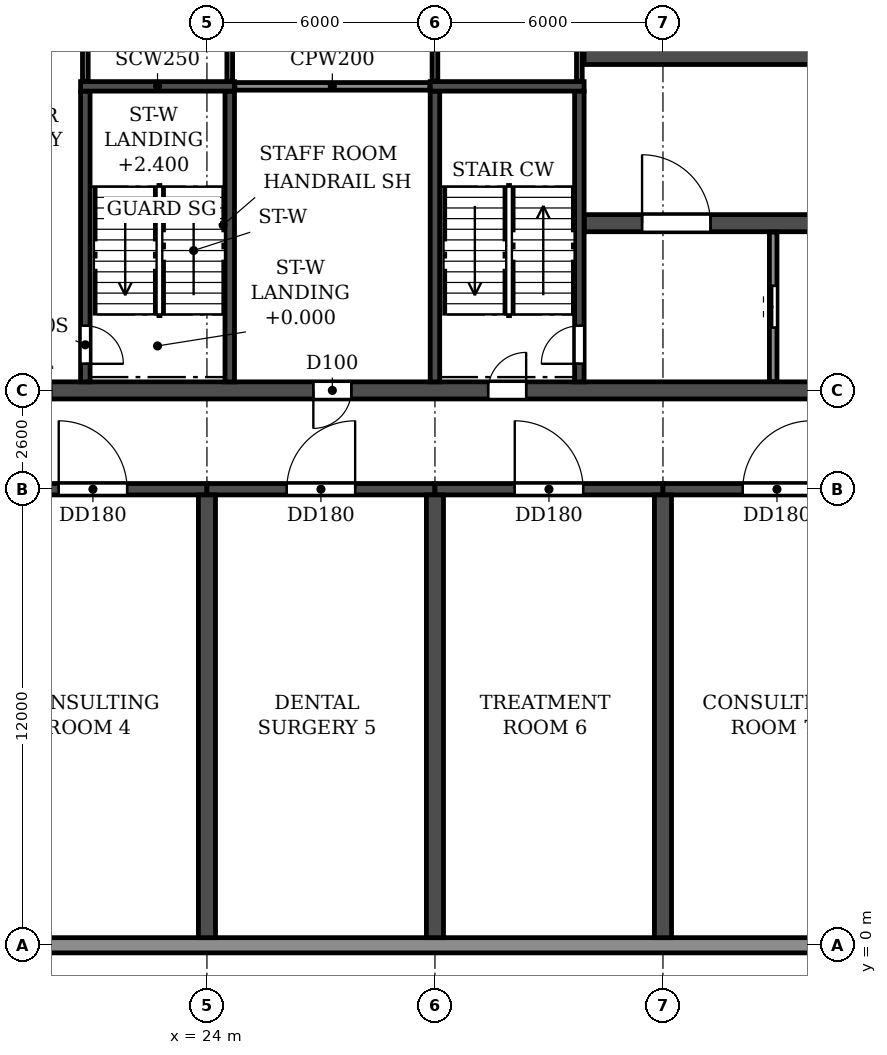
"""IFC4 building model, lengths in metres.
Left out: names, types, materials, properties, quantities, classifications, styles, units other than length and angle.
Written with IfcOpenShell. Run it as: python <this file> out.ifc"""

import sys

from ifc_helpers import new_model, si_unit, direction, frame, frame_2d, origin, place, context, subcontext, project, spatial, rectangle, extrude, element, fill, save


model = new_model("IFC4")
c1 = context("Model", 3, precision=1e-05, world=origin(), true_north=direction((0.0, 1.0)))
c2 = subcontext(c1, "Body", "Model", "MODEL_VIEW")
j1 = project(units=[si_unit("LENGTHUNIT", "METRE"), si_unit("PLANEANGLEUNIT", "RADIAN")], contexts=[c1])
p1 = place(None, origin())
s1 = spatial("IfcSite", under=j1, at=p1, CompositionType="ELEMENT")
p2 = place(p1, origin())
s2 = spatial("IfcBuilding", under=s1, at=p2, CompositionType="ELEMENT")
p3 = place(p2, frame((0.0, 0.0, 6.0)))
s3 = spatial("IfcBuildingStorey", under=s2, at=p3, CompositionType="ELEMENT", Elevation=6.0)
for number, where, z_axis, x_axis in (
    (1, (24.0, 0.2, 0.0), (0.0, 0.0, 1.0), (0.0, 1.0, 0.0)),
    (2, (30.0, 0.2, 0.0), (0.0, 0.0, 1.0), (0.0, 1.0, 0.0)),
    (3, (36.0, 0.2, 0.0), (0.0, 0.0, 1.0), (0.0, 1.0, 0.0)),
):
    element("IfcWall", number, at=place(p3, frame(where, z_axis=z_axis, x_axis=x_axis)), inside=s3, PredefinedType="SHEAR", context=c2, shape_type="SweptSolid", body=[
        extrude(rectangle(XDim=11.65, YDim=0.45, at=frame_2d((5.825, 0.0))), origin(), (0.0, 0.0, 1.0), 4.52),
    ])
p4 = place(p3, frame((18.0, 12.0, 0.0), z_axis=(0.0, 0.0, 1.0), x_axis=(1.0, 0.0, 0.0)))
e4 = element("IfcWall", 4, at=p4, inside=s3, PredefinedType="SHEAR", context=c2, shape_type="SweptSolid", body=[
    extrude(rectangle(XDim=6.0, YDim=0.3, at=frame_2d((3.0, 0.0))), origin(), (0.0, 0.0, 1.0), 3.92),
])
p5 = place(p4, frame((2.1, 0.0, 0.0)))
e5 = element("IfcOpeningElement", 5, at=p5, cuts=e4, PredefinedType="OPENING", context=c2, shape_type="SweptSolid", body=[
    extrude(rectangle(XDim=1.8, YDim=2.1, at=frame_2d((0.9, 1.05))), frame((0.0, 0.16, 0.0), z_axis=(0.0, -1.0, 0.0), x_axis=(1.0, 0.0, 0.0)), (0.0, 0.0, 1.0), 0.32),
])
p6 = place(p3, frame((24.0, 12.0, 0.0), z_axis=(0.0, 0.0, 1.0), x_axis=(1.0, 0.0, 0.0)))
e6 = element("IfcWall", 6, at=p6, inside=s3, PredefinedType="SHEAR", context=c2, shape_type="SweptSolid", body=[
    extrude(rectangle(XDim=6.0, YDim=0.3, at=frame_2d((3.0, 0.0))), origin(), (0.0, 0.0, 1.0), 3.92),
])
p7 = place(p6, frame((2.1, 0.0, 0.0)))
e7 = element("IfcOpeningElement", 7, at=p7, cuts=e6, PredefinedType="OPENING", context=c2, shape_type="SweptSolid", body=[
    extrude(rectangle(XDim=1.8, YDim=2.1, at=frame_2d((0.9, 1.05))), frame((0.0, 0.16, 0.0), z_axis=(0.0, -1.0, 0.0), x_axis=(1.0, 0.0, 0.0)), (0.0, 0.0, 1.0), 0.32),
])
p8 = place(p3, frame((30.0, 12.0, 0.0), z_axis=(0.0, 0.0, 1.0), x_axis=(1.0, 0.0, 0.0)))
e8 = element("IfcWall", 8, at=p8, inside=s3, PredefinedType="SHEAR", context=c2, shape_type="SweptSolid", body=[
    extrude(rectangle(XDim=6.0, YDim=0.3, at=frame_2d((3.0, 0.0))), origin(), (0.0, 0.0, 1.0), 3.92),
])
p9 = place(p8, frame((2.1, 0.0, 0.0)))
e9 = element("IfcOpeningElement", 9, at=p9, cuts=e8, PredefinedType="OPENING", context=c2, shape_type="SweptSolid", body=[
    extrude(rectangle(XDim=1.8, YDim=2.1, at=frame_2d((0.9, 1.05))), frame((0.0, 0.16, 0.0), z_axis=(0.0, -1.0, 0.0), x_axis=(1.0, 0.0, 0.0)), (0.0, 0.0, 1.0), 0.32),
])
p10 = place(p3, frame((36.0, 12.0, 0.0), z_axis=(0.0, 0.0, 1.0), x_axis=(1.0, 0.0, 0.0)))
e10 = element("IfcWall", 10, at=p10, inside=s3, PredefinedType="SHEAR", context=c2, shape_type="SweptSolid", body=[
    extrude(rectangle(XDim=6.0, YDim=0.3, at=frame_2d((3.0, 0.0))), origin(), (0.0, 0.0, 1.0), 3.92),
])
p11 = place(p10, frame((2.1, 0.0, 0.0)))
e11 = element("IfcOpeningElement", 11, at=p11, cuts=e10, PredefinedType="OPENING", context=c2, shape_type="SweptSolid", body=[
    extrude(rectangle(XDim=1.8, YDim=2.1, at=frame_2d((0.9, 1.05))), frame((0.0, 0.16, 0.0), z_axis=(0.0, -1.0, 0.0), x_axis=(1.0, 0.0, 0.0)), (0.0, 0.0, 1.0), 0.32),
])
p12 = place(p3, frame((18.0, 14.6, 0.0), z_axis=(0.0, 0.0, 1.0), x_axis=(1.0, 0.0, 0.0)))
e12 = element("IfcWall", 12, at=p12, inside=s3, PredefinedType="SOLIDWALL", context=c2, shape_type="SweptSolid", body=[
    extrude(rectangle(XDim=66.0, YDim=0.45, at=frame_2d((33.0, 0.0))), origin(), (0.0, 0.0, 1.0), 4.52),
])
p13 = place(p12, frame((0.9, 0.0, 0.0)))
e13 = element("IfcOpeningElement", 13, at=p13, cuts=e12, PredefinedType="OPENING", context=c2, shape_type="SweptSolid", body=[
    extrude(rectangle(XDim=1.0, YDim=2.1, at=frame_2d((0.5, 1.05))), frame((0.0, 0.235, 0.0), z_axis=(0.0, -1.0, 0.0), x_axis=(1.0, 0.0, 0.0)), (0.0, 0.0, 1.0), 0.47),
])
p14 = place(p12, frame((8.8, 0.0, 0.0)))
e14 = element("IfcOpeningElement", 14, at=p14, cuts=e12, PredefinedType="OPENING", context=c2, shape_type="SweptSolid", body=[
    extrude(rectangle(XDim=1.0, YDim=2.1, at=frame_2d((0.5, 1.05))), frame((0.0, 0.235, 0.0), z_axis=(0.0, -1.0, 0.0), x_axis=(1.0, 0.0, 0.0)), (0.0, 0.0, 1.0), 0.47),
])
p15 = place(p12, frame((13.4, 0.0, 0.0)))
e15 = element("IfcOpeningElement", 15, at=p15, cuts=e12, PredefinedType="OPENING", context=c2, shape_type="SweptSolid", body=[
    extrude(rectangle(XDim=1.0, YDim=2.1, at=frame_2d((0.5, 1.05))), frame((0.0, 0.235, 0.0), z_axis=(0.0, -1.0, 0.0), x_axis=(1.0, 0.0, 0.0)), (0.0, 0.0, 1.0), 0.47),
])
p16 = place(p12, frame((26.0, 0.0, 0.0)))
e16 = element("IfcOpeningElement", 16, at=p16, cuts=e12, PredefinedType="OPENING", context=c2, shape_type="SweptSolid", body=[
    extrude(rectangle(XDim=1.0, YDim=2.1, at=frame_2d((0.5, 1.05))), frame((0.0, 0.235, 0.0), z_axis=(0.0, -1.0, 0.0), x_axis=(1.0, 0.0, 0.0)), (0.0, 0.0, 1.0), 0.47),
])
p17 = place(p12, frame((29.9, 0.0, 0.0)))
e17 = element("IfcOpeningElement", 17, at=p17, cuts=e12, PredefinedType="OPENING", context=c2, shape_type="SweptSolid", body=[
    extrude(rectangle(XDim=1.0, YDim=2.1, at=frame_2d((0.5, 1.05))), frame((0.0, 0.235, 0.0), z_axis=(0.0, -1.0, 0.0), x_axis=(1.0, 0.0, 0.0)), (0.0, 0.0, 1.0), 0.47),
])
p18 = place(p12, frame((32.5, 0.0, 0.0)))
e18 = element("IfcOpeningElement", 18, at=p18, cuts=e12, PredefinedType="OPENING", context=c2, shape_type="SweptSolid", body=[
    extrude(rectangle(XDim=1.0, YDim=2.1, at=frame_2d((0.5, 1.05))), frame((0.0, 0.235, 0.0), z_axis=(0.0, -1.0, 0.0), x_axis=(1.0, 0.0, 0.0)), (0.0, 0.0, 1.0), 0.47),
])
p19 = place(p12, frame((37.7, 0.0, 0.0)))
e19 = element("IfcOpeningElement", 19, at=p19, cuts=e12, PredefinedType="OPENING", context=c2, shape_type="SweptSolid", body=[
    extrude(rectangle(XDim=1.0, YDim=2.1, at=frame_2d((0.5, 1.05))), frame((0.0, 0.235, 0.0), z_axis=(0.0, -1.0, 0.0), x_axis=(1.0, 0.0, 0.0)), (0.0, 0.0, 1.0), 0.47),
])
p20 = place(p12, frame((51.6, 0.0, 0.0)))
e20 = element("IfcOpeningElement", 20, at=p20, cuts=e12, PredefinedType="OPENING", context=c2, shape_type="SweptSolid", body=[
    extrude(rectangle(XDim=1.0, YDim=2.1, at=frame_2d((0.5, 1.05))), frame((0.0, 0.235, 0.0), z_axis=(0.0, -1.0, 0.0), x_axis=(1.0, 0.0, 0.0)), (0.0, 0.0, 1.0), 0.47),
])
p21 = place(p12, frame((56.2, 0.0, 0.0)))
e21 = element("IfcOpeningElement", 21, at=p21, cuts=e12, PredefinedType="OPENING", context=c2, shape_type="SweptSolid", body=[
    extrude(rectangle(XDim=1.0, YDim=2.1, at=frame_2d((0.5, 1.05))), frame((0.0, 0.235, 0.0), z_axis=(0.0, -1.0, 0.0), x_axis=(1.0, 0.0, 0.0)), (0.0, 0.0, 1.0), 0.47),
])
p22 = place(p12, frame((64.1, 0.0, 0.0)))
e22 = element("IfcOpeningElement", 22, at=p22, cuts=e12, PredefinedType="OPENING", context=c2, shape_type="SweptSolid", body=[
    extrude(rectangle(XDim=1.0, YDim=2.1, at=frame_2d((0.5, 1.05))), frame((0.0, 0.235, 0.0), z_axis=(0.0, -1.0, 0.0), x_axis=(1.0, 0.0, 0.0)), (0.0, 0.0, 1.0), 0.47),
])
p23 = place(p3, frame((33.925, 19.0, 0.0), z_axis=(0.0, 0.0, 1.0), x_axis=(1.0, 0.0, 0.0)))
e23 = element("IfcWall", 23, at=p23, inside=s3, PredefinedType="SOLIDWALL", context=c2, shape_type="SweptSolid", body=[
    extrude(rectangle(XDim=34.15, YDim=0.45, at=frame_2d((17.075, 0.0))), origin(), (0.0, 0.0, 1.0), 4.52),
])
p24 = place(p23, frame((16.175, 0.0, 0.0)))
e24 = element("IfcOpeningElement", 24, at=p24, cuts=e23, PredefinedType="OPENING", context=c2, shape_type="SweptSolid", body=[
    extrude(rectangle(XDim=1.8, YDim=2.1, at=frame_2d((0.9, 1.05))), frame((0.0, 0.235, 0.0), z_axis=(0.0, -1.0, 0.0), x_axis=(1.0, 0.0, 0.0)), (0.0, 0.0, 1.0), 0.47),
])
p25 = place(p23, frame((1.525, 0.0, 0.0)))
e25 = element("IfcOpeningElement", 25, at=p25, cuts=e23, PredefinedType="OPENING", context=c2, shape_type="SweptSolid", body=[
    extrude(rectangle(XDim=1.8, YDim=2.1, at=frame_2d((0.9, 1.05))), frame((0.0, 0.235, 0.0), z_axis=(0.0, -1.0, 0.0), x_axis=(1.0, 0.0, 0.0)), (0.0, 0.0, 1.0), 0.47),
])
p26 = place(p23, frame((8.725, 0.0, 0.0)))
e26 = element("IfcOpeningElement", 26, at=p26, cuts=e23, PredefinedType="OPENING", context=c2, shape_type="SweptSolid", body=[
    extrude(rectangle(XDim=1.1, YDim=2.1, at=frame_2d((0.55, 1.05))), frame((0.0, 0.235, 0.0), z_axis=(0.0, -1.0, 0.0), x_axis=(1.0, 0.0, 0.0)), (0.0, 0.0, 1.0), 0.47),
])
p27 = place(p23, frame((11.325, 0.0, 0.0)))
e27 = element("IfcOpeningElement", 27, at=p27, cuts=e23, PredefinedType="OPENING", context=c2, shape_type="SweptSolid", body=[
    extrude(rectangle(XDim=1.1, YDim=2.1, at=frame_2d((0.55, 1.05))), frame((0.0, 0.235, 0.0), z_axis=(0.0, -1.0, 0.0), x_axis=(1.0, 0.0, 0.0)), (0.0, 0.0, 1.0), 0.47),
])
p28 = place(p23, frame((13.925, 0.0, 0.0)))
e28 = element("IfcOpeningElement", 28, at=p28, cuts=e23, PredefinedType="OPENING", context=c2, shape_type="SweptSolid", body=[
    extrude(rectangle(XDim=1.1, YDim=2.1, at=frame_2d((0.55, 1.05))), frame((0.0, 0.235, 0.0), z_axis=(0.0, -1.0, 0.0), x_axis=(1.0, 0.0, 0.0)), (0.0, 0.0, 1.0), 0.47),
])
p29 = place(p23, frame((19.125, 0.0, 0.0)))
e29 = element("IfcOpeningElement", 29, at=p29, cuts=e23, PredefinedType="OPENING", context=c2, shape_type="SweptSolid", body=[
    extrude(rectangle(XDim=1.1, YDim=2.1, at=frame_2d((0.55, 1.05))), frame((0.0, 0.235, 0.0), z_axis=(0.0, -1.0, 0.0), x_axis=(1.0, 0.0, 0.0)), (0.0, 0.0, 1.0), 0.47),
])
p30 = place(p23, frame((21.725, 0.0, 0.0)))
e30 = element("IfcOpeningElement", 30, at=p30, cuts=e23, PredefinedType="OPENING", context=c2, shape_type="SweptSolid", body=[
    extrude(rectangle(XDim=1.1, YDim=2.1, at=frame_2d((0.55, 1.05))), frame((0.0, 0.235, 0.0), z_axis=(0.0, -1.0, 0.0), x_axis=(1.0, 0.0, 0.0)), (0.0, 0.0, 1.0), 0.47),
])
p31 = place(p23, frame((24.325, 0.0, 0.0)))
e31 = element("IfcOpeningElement", 31, at=p31, cuts=e23, PredefinedType="OPENING", context=c2, shape_type="SweptSolid", body=[
    extrude(rectangle(XDim=1.1, YDim=2.1, at=frame_2d((0.55, 1.05))), frame((0.0, 0.235, 0.0), z_axis=(0.0, -1.0, 0.0), x_axis=(1.0, 0.0, 0.0)), (0.0, 0.0, 1.0), 0.47),
])
p32 = place(p23, frame((30.825, 0.0, 0.0)))
e32 = element("IfcOpeningElement", 32, at=p32, cuts=e23, PredefinedType="OPENING", context=c2, shape_type="SweptSolid", body=[
    extrude(rectangle(XDim=1.8, YDim=2.1, at=frame_2d((0.9, 1.05))), frame((0.0, 0.235, 0.0), z_axis=(0.0, -1.0, 0.0), x_axis=(1.0, 0.0, 0.0)), (0.0, 0.0, 1.0), 0.47),
])
p33 = place(p3, frame((33.925, 23.4, 0.0), z_axis=(0.0, 0.0, 1.0), x_axis=(1.0, 0.0, 0.0)))
e33 = element("IfcWall", 33, at=p33, inside=s3, PredefinedType="SOLIDWALL", context=c2, shape_type="SweptSolid", body=[
    extrude(rectangle(XDim=34.15, YDim=0.45, at=frame_2d((17.075, 0.0))), origin(), (0.0, 0.0, 1.0), 4.52),
])
p34 = place(p33, frame((16.175, 0.0, 0.0)))
e34 = element("IfcOpeningElement", 34, at=p34, cuts=e33, PredefinedType="OPENING", context=c2, shape_type="SweptSolid", body=[
    extrude(rectangle(XDim=1.8, YDim=2.1, at=frame_2d((0.9, 1.05))), frame((0.0, 0.235, 0.0), z_axis=(0.0, -1.0, 0.0), x_axis=(1.0, 0.0, 0.0)), (0.0, 0.0, 1.0), 0.47),
])
p35 = place(p33, frame((11.025, 0.0, 0.0)))
e35 = element("IfcOpeningElement", 35, at=p35, cuts=e33, PredefinedType="OPENING", context=c2, shape_type="SweptSolid", body=[
    extrude(rectangle(XDim=1.1, YDim=2.1, at=frame_2d((0.55, 1.05))), frame((0.0, 0.235, 0.0), z_axis=(0.0, -1.0, 0.0), x_axis=(1.0, 0.0, 0.0)), (0.0, 0.0, 1.0), 0.47),
])
p36 = place(p33, frame((29.825, 0.0, 0.0)))
e36 = element("IfcOpeningElement", 36, at=p36, cuts=e33, PredefinedType="OPENING", context=c2, shape_type="SweptSolid", body=[
    extrude(rectangle(XDim=1.1, YDim=2.1, at=frame_2d((0.55, 1.05))), frame((0.0, 0.235, 0.0), z_axis=(0.0, -1.0, 0.0), x_axis=(1.0, 0.0, 0.0)), (0.0, 0.0, 1.0), 0.47),
])
p37 = place(p33, frame((32.425, 0.0, 0.0)))
e37 = element("IfcOpeningElement", 37, at=p37, cuts=e33, PredefinedType="OPENING", context=c2, shape_type="SweptSolid", body=[
    extrude(rectangle(XDim=1.1, YDim=2.1, at=frame_2d((0.55, 1.05))), frame((0.0, 0.235, 0.0), z_axis=(0.0, -1.0, 0.0), x_axis=(1.0, 0.0, 0.0)), (0.0, 0.0, 1.0), 0.47),
])
p38 = place(p3, frame((30.0, 14.825, 0.0), z_axis=(0.0, 0.0, 1.0), x_axis=(0.0, 1.0, 0.0)))
e38 = element("IfcWall", 38, at=p38, inside=s3, PredefinedType="SOLIDWALL", context=c2, shape_type="SweptSolid", body=[
    extrude(rectangle(XDim=7.65, YDim=0.25, at=frame_2d((3.825, 0.0))), origin(), (0.0, 0.0, 1.0), 4.52),
])
p39 = place(p3, frame((33.8, 14.825, 0.0), z_axis=(0.0, 0.0, 1.0), x_axis=(0.0, 1.0, 0.0)))
e39 = element("IfcWall", 39, at=p39, inside=s3, PredefinedType="SOLIDWALL", context=c2, shape_type="SweptSolid", body=[
    extrude(rectangle(XDim=7.65, YDim=0.25, at=frame_2d((3.825, 0.0))), origin(), (0.0, 0.0, 1.0), 4.52),
])
p40 = place(p39, frame((0.475, 0.0, 0.0)))
e40 = element("IfcOpeningElement", 40, at=p40, cuts=e39, PredefinedType="OPENING", context=c2, shape_type="SweptSolid", body=[
    extrude(rectangle(XDim=1.0, YDim=2.1, at=frame_2d((0.5, 1.05))), frame((0.0, 0.135, 0.0), z_axis=(0.0, -1.0, 0.0), x_axis=(1.0, 0.0, 0.0)), (0.0, 0.0, 1.0), 0.27),
])
p41 = place(p3, frame((29.875, 22.6, 0.0), z_axis=(0.0, 0.0, 1.0), x_axis=(1.0, 0.0, 0.0)))
e41 = element("IfcWall", 41, at=p41, inside=s3, PredefinedType="SOLIDWALL", context=c2, shape_type="SweptSolid", body=[
    extrude(rectangle(XDim=4.05, YDim=0.25, at=frame_2d((2.025, 0.0))), origin(), (0.0, 0.0, 1.0), 4.52),
])
p42 = place(p3, frame((20.8, 14.825, 0.0), z_axis=(0.0, 0.0, 1.0), x_axis=(0.0, 1.0, 0.0)))
e42 = element("IfcWall", 42, at=p42, inside=s3, PredefinedType="SOLIDWALL", context=c2, shape_type="SweptSolid", body=[
    extrude(rectangle(XDim=7.65, YDim=0.25, at=frame_2d((3.825, 0.0))), origin(), (0.0, 0.0, 1.0), 4.52),
])
p43 = place(p42, frame((0.475, 0.0, 0.0)))
e43 = element("IfcOpeningElement", 43, at=p43, cuts=e42, PredefinedType="OPENING", context=c2, shape_type="SweptSolid", body=[
    extrude(rectangle(XDim=1.0, YDim=2.1, at=frame_2d((0.5, 1.05))), frame((0.0, 0.135, 0.0), z_axis=(0.0, -1.0, 0.0), x_axis=(1.0, 0.0, 0.0)), (0.0, 0.0, 1.0), 0.27),
])
p44 = place(p3, frame((24.6, 14.825, 0.0), z_axis=(0.0, 0.0, 1.0), x_axis=(0.0, 1.0, 0.0)))
e44 = element("IfcWall", 44, at=p44, inside=s3, PredefinedType="SOLIDWALL", context=c2, shape_type="SweptSolid", body=[
    extrude(rectangle(XDim=7.65, YDim=0.25, at=frame_2d((3.825, 0.0))), origin(), (0.0, 0.0, 1.0), 4.52),
])
p45 = place(p3, frame((20.675, 22.6, 0.0), z_axis=(0.0, 0.0, 1.0), x_axis=(1.0, 0.0, 0.0)))
e45 = element("IfcWall", 45, at=p45, inside=s3, PredefinedType="SOLIDWALL", context=c2, shape_type="SweptSolid", body=[
    extrude(rectangle(XDim=4.05, YDim=0.25, at=frame_2d((2.025, 0.0))), origin(), (0.0, 0.0, 1.0), 4.52),
])
p46 = place(p3, frame((-3.0, 0.0, 0.0), z_axis=(0.0, 0.0, 1.0), x_axis=(1.0, 0.0, 0.0)))
e46 = element("IfcWall", 46, at=p46, inside=s3, PredefinedType="STANDARD", context=c2, shape_type="SweptSolid", body=[
    extrude(rectangle(XDim=108.0, YDim=0.4, at=frame_2d((54.0, 0.0))), origin(), (0.0, 0.0, 1.0), 4.52),
])
p47 = place(p3, frame((24.735, 22.6, 0.0), z_axis=(0.0, 0.0, 1.0), x_axis=(1.0, 0.0, 0.0)))
e47 = element("IfcWall", 47, at=p47, inside=s3, PredefinedType="PARTITIONING", context=c2, shape_type="SweptSolid", body=[
    extrude(rectangle(XDim=5.13, YDim=0.2, at=frame_2d((2.565, 0.0))), origin(), (0.0, 0.0, 1.0), 4.52),
])
for number, where, z_axis, x_axis in (
    (48, (20.8, 22.735, 0.0), (0.0, 0.0, 1.0), (0.0, 1.0, 0.0)),
    (49, (24.6, 22.735, 0.0), (0.0, 0.0, 1.0), (0.0, 1.0, 0.0)),
    (50, (30.0, 22.735, 0.0), (0.0, 0.0, 1.0), (0.0, 1.0, 0.0)),
    (51, (33.8, 22.735, 0.0), (0.0, 0.0, 1.0), (0.0, 1.0, 0.0)),
):
    element("IfcWall", number, at=place(p3, frame(where, z_axis=z_axis, x_axis=x_axis)), inside=s3, PredefinedType="PARTITIONING", context=c2, shape_type="SweptSolid", body=[
        extrude(rectangle(XDim=4.83, YDim=0.15, at=frame_2d((2.415, 0.0))), origin(), (0.0, 0.0, 1.0), 4.52),
    ])
p48 = place(p3, frame((38.9, 14.835, 0.0), z_axis=(0.0, 0.0, 1.0), x_axis=(0.0, 1.0, 0.0)))
e52 = element("IfcWall", 52, at=p48, inside=s3, PredefinedType="PARTITIONING", context=c2, shape_type="SweptSolid", body=[
    extrude(rectangle(XDim=3.93, YDim=0.2, at=frame_2d((1.965, 0.0))), origin(), (0.0, 0.0, 1.0), 4.52),
])
p49 = place(p48, frame((1.415, 0.0, 0.0)))
e53 = element("IfcOpeningElement", 53, at=p49, cuts=e52, PredefinedType="OPENING", context=c2, shape_type="SweptSolid", body=[
    extrude(rectangle(XDim=1.1, YDim=2.1, at=frame_2d((0.55, 1.05))), frame((0.0, 0.11, 0.0), z_axis=(0.0, -1.0, 0.0), x_axis=(1.0, 0.0, 0.0)), (0.0, 0.0, 1.0), 0.22),
])
p50 = place(p5, origin())
e54 = element("IfcDoor", 54, at=p50, inside=s3, OperationType="DOUBLE_DOOR_SINGLE_SWING", PredefinedType="DOOR", context=c2, shape_type="SweptSolid", body=[
    extrude(rectangle(XDim=1.8, YDim=2.1, at=frame_2d((0.9, 1.05))), frame((0.0, 0.025, 0.0), z_axis=(0.0, -1.0, 0.0), x_axis=(1.0, 0.0, 0.0)), (0.0, 0.0, 1.0), 0.05),
])
fill(e5, e54)
p51 = place(p7, origin())
e55 = element("IfcDoor", 55, at=p51, inside=s3, OperationType="DOUBLE_DOOR_SINGLE_SWING", PredefinedType="DOOR", context=c2, shape_type="SweptSolid", body=[
    extrude(rectangle(XDim=1.8, YDim=2.1, at=frame_2d((0.9, 1.05))), frame((0.0, 0.025, 0.0), z_axis=(0.0, -1.0, 0.0), x_axis=(1.0, 0.0, 0.0)), (0.0, 0.0, 1.0), 0.05),
])
fill(e7, e55)
p52 = place(p14, frame((1.0, 0.0, 0.0), z_axis=(0.0, 0.0, 1.0), x_axis=(-1.0, 0.0, 0.0)))
e56 = element("IfcDoor", 56, at=p52, inside=s3, OperationType="SINGLE_SWING_RIGHT", PredefinedType="DOOR", context=c2, shape_type="SweptSolid", body=[
    extrude(rectangle(XDim=1.0, YDim=2.1, at=frame_2d((0.5, 1.05))), frame((0.0, 0.025, 0.0), z_axis=(0.0, -1.0, 0.0), x_axis=(1.0, 0.0, 0.0)), (0.0, 0.0, 1.0), 0.05),
])
fill(e14, e56)
p53 = place(p15, origin())
e57 = element("IfcDoor", 57, at=p53, inside=s3, OperationType="SINGLE_SWING_RIGHT", PredefinedType="DOOR", context=c2, shape_type="SweptSolid", body=[
    extrude(rectangle(XDim=1.0, YDim=2.1, at=frame_2d((0.5, 1.05))), frame((0.0, 0.025, 0.0), z_axis=(0.0, -1.0, 0.0), x_axis=(1.0, 0.0, 0.0)), (0.0, 0.0, 1.0), 0.05),
])
fill(e15, e57)
p54 = place(p9, origin())
e58 = element("IfcDoor", 58, at=p54, inside=s3, OperationType="DOUBLE_DOOR_SINGLE_SWING", PredefinedType="DOOR", context=c2, shape_type="SweptSolid", body=[
    extrude(rectangle(XDim=1.8, YDim=2.1, at=frame_2d((0.9, 1.05))), frame((0.0, 0.025, 0.0), z_axis=(0.0, -1.0, 0.0), x_axis=(1.0, 0.0, 0.0)), (0.0, 0.0, 1.0), 0.05),
])
fill(e9, e58)
p55 = place(p11, origin())
e59 = element("IfcDoor", 59, at=p55, inside=s3, OperationType="DOUBLE_DOOR_SINGLE_SWING", PredefinedType="DOOR", context=c2, shape_type="SweptSolid", body=[
    extrude(rectangle(XDim=1.8, YDim=2.1, at=frame_2d((0.9, 1.05))), frame((0.0, 0.025, 0.0), z_axis=(0.0, -1.0, 0.0), x_axis=(1.0, 0.0, 0.0)), (0.0, 0.0, 1.0), 0.05),
])
fill(e11, e59)
p56 = place(p40, origin())
e60 = element("IfcDoor", 60, at=p56, inside=s3, OperationType="SINGLE_SWING_LEFT", PredefinedType="DOOR", context=c2, shape_type="SweptSolid", body=[
    extrude(rectangle(XDim=1.0, YDim=2.1, at=frame_2d((0.5, 1.05))), frame((0.0, 0.025, 0.0), z_axis=(0.0, -1.0, 0.0), x_axis=(1.0, 0.0, 0.0)), (0.0, 0.0, 1.0), 0.05),
])
fill(e40, e60)
p57 = place(p49, origin())
e61 = element("IfcDoor", 61, at=p57, inside=s3, OperationType="DOUBLE_DOOR_SLIDING", PredefinedType="DOOR", context=c2, shape_type="SweptSolid", body=[
    extrude(rectangle(XDim=1.1, YDim=2.1, at=frame_2d((0.55, 1.05))), frame((0.0, 0.025, 0.0), z_axis=(0.0, -1.0, 0.0), x_axis=(1.0, 0.0, 0.0)), (0.0, 0.0, 1.0), 0.05),
])
fill(e53, e61)
p58 = place(p25, origin())
e62 = element("IfcDoor", 62, at=p58, inside=s3, OperationType="DOUBLE_DOOR_SINGLE_SWING", PredefinedType="DOOR", context=c2, shape_type="SweptSolid", body=[
    extrude(rectangle(XDim=1.8, YDim=2.1, at=frame_2d((0.9, 1.05))), frame((0.0, 0.025, 0.0), z_axis=(0.0, -1.0, 0.0), x_axis=(1.0, 0.0, 0.0)), (0.0, 0.0, 1.0), 0.05),
])
fill(e25, e62)
p59 = place(p43, frame((1.0, 0.0, 0.0), z_axis=(0.0, 0.0, 1.0), x_axis=(-1.0, 0.0, 0.0)))
e63 = element("IfcDoor", 63, at=p59, inside=s3, OperationType="SINGLE_SWING_RIGHT", PredefinedType="DOOR", context=c2, shape_type="SweptSolid", body=[
    extrude(rectangle(XDim=1.0, YDim=2.1, at=frame_2d((0.5, 1.05))), frame((0.0, 0.025, 0.0), z_axis=(0.0, -1.0, 0.0), x_axis=(1.0, 0.0, 0.0)), (0.0, 0.0, 1.0), 0.05),
])
fill(e43, e63)
save(model, sys.argv[1])
